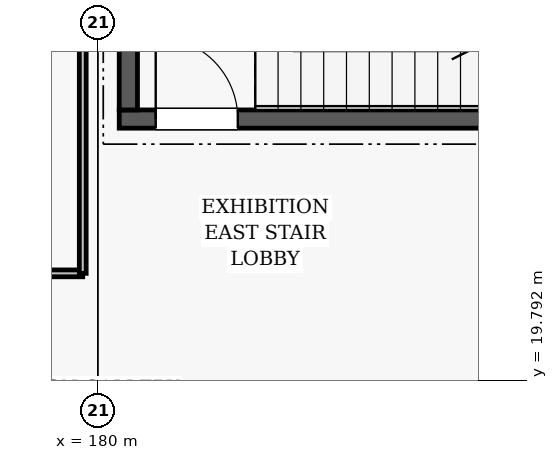
"""IFC4 building model, lengths in metres.
Left out: names, types, materials, properties, quantities, classifications, styles, units other than length and angle.
Written with IfcOpenShell. Run it as: python <this file> out.ifc"""

import sys

from ifc_helpers import new_model, si_unit, direction, frame, frame_2d, origin, place, context, subcontext, project, spatial, rectangle, extrude, element, fill, save


model = new_model("IFC4")
c1 = context("Model", 3, precision=1e-05, world=origin(), true_north=direction((0.0, 1.0)))
c2 = subcontext(c1, "Body", "Model", "MODEL_VIEW")
j1 = project(units=[si_unit("LENGTHUNIT", "METRE"), si_unit("PLANEANGLEUNIT", "RADIAN")], contexts=[c1])
p1 = place(None, origin())
s1 = spatial("IfcSite", under=j1, at=p1, CompositionType="ELEMENT")
p2 = place(p1, origin())
s2 = spatial("IfcBuilding", under=s1, at=p2, CompositionType="ELEMENT")
p3 = place(p2, frame((0.0, 0.0, 4.8)))
s3 = spatial("IfcBuildingStorey", under=s2, at=p3, CompositionType="ELEMENT", Elevation=4.8)
p4 = place(p3, frame((180.28, 23.23, 0.0), z_axis=(0.0, 0.0, 1.0), x_axis=(1.0, 0.0, 0.0)))
e1 = element("IfcWall", 1, at=p4, inside=s3, PredefinedType="SHEAR", context=c2, shape_type="SweptSolid", body=[
    extrude(rectangle(XDim=8.44, YDim=0.24, at=frame_2d((4.22, 0.0))), origin(), (0.0, 0.0, 1.0), 3.35),
])
p5 = place(p4, frame((0.48, 0.0, 0.0)))
e2 = element("IfcOpeningElement", 2, at=p5, cuts=e1, PredefinedType="OPENING", context=c2, shape_type="SweptSolid", body=[
    extrude(rectangle(XDim=1.08, YDim=2.08, at=frame_2d((0.54, 1.04))), frame((0.0, 0.13, 0.0), z_axis=(0.0, -1.0, 0.0), x_axis=(1.0, 0.0, 0.0)), (0.0, 0.0, 1.0), 0.26),
])
p6 = place(p3, frame((180.4, 23.35, 0.0), z_axis=(0.0, 0.0, 1.0), x_axis=(0.0, 1.0, 0.0)))
e3 = element("IfcWall", 3, at=p6, inside=s3, PredefinedType="SHEAR", context=c2, shape_type="SweptSolid", body=[
    extrude(rectangle(XDim=3.25, YDim=0.24, at=frame_2d((1.625, 0.0))), origin(), (0.0, 0.0, 1.0), 3.35),
])
p7 = place(p3, frame((135.4, 21.2, 0.0), z_axis=(0.0, 0.0, 1.0), x_axis=(1.0, 0.0, 0.0)))
e4 = element("IfcWall", 4, at=p7, inside=s3, PredefinedType="MOVABLE", context=c2, shape_type="SweptSolid", body=[
    extrude(rectangle(XDim=44.4, YDim=0.09, at=frame_2d((22.2, 0.0))), origin(), (0.0, 0.0, 1.0), 2.685),
])
p8 = place(p7, frame((21.26, 0.0, 0.0)))
e5 = element("IfcOpeningElement", 5, at=p8, cuts=e4, PredefinedType="OPENING", context=c2, shape_type="SweptSolid", body=[
    extrude(rectangle(XDim=1.68, YDim=2.14, at=frame_2d((0.84, 1.07))), frame((0.0, 0.055, 0.0), z_axis=(0.0, -1.0, 0.0), x_axis=(1.0, 0.0, 0.0)), (0.0, 0.0, 1.0), 0.11),
])
p9 = place(p3, frame((179.8, 21.2, 0.0), z_axis=(0.0, 0.0, 1.0), x_axis=(0.0, 1.0, 0.0)))
e6 = element("IfcWall", 6, at=p9, inside=s3, PredefinedType="MOVABLE", context=c2, shape_type="SweptSolid", body=[
    extrude(rectangle(XDim=5.4, YDim=0.09, at=frame_2d((2.7, 0.0))), origin(), (0.0, 0.0, 1.0), 2.685),
])
p10 = place(p5, origin())
e7 = element("IfcDoor", 7, at=p10, inside=s3, OperationType="SINGLE_SWING_LEFT", PredefinedType="DOOR", context=c2, shape_type="SweptSolid", body=[
    extrude(rectangle(XDim=1.08, YDim=2.08, at=frame_2d((0.54, 1.04))), frame((0.0, 0.025, 0.0), z_axis=(0.0, -1.0, 0.0), x_axis=(1.0, 0.0, 0.0)), (0.0, 0.0, 1.0), 0.05),
])
fill(e2, e7)
save(model, sys.argv[1])
